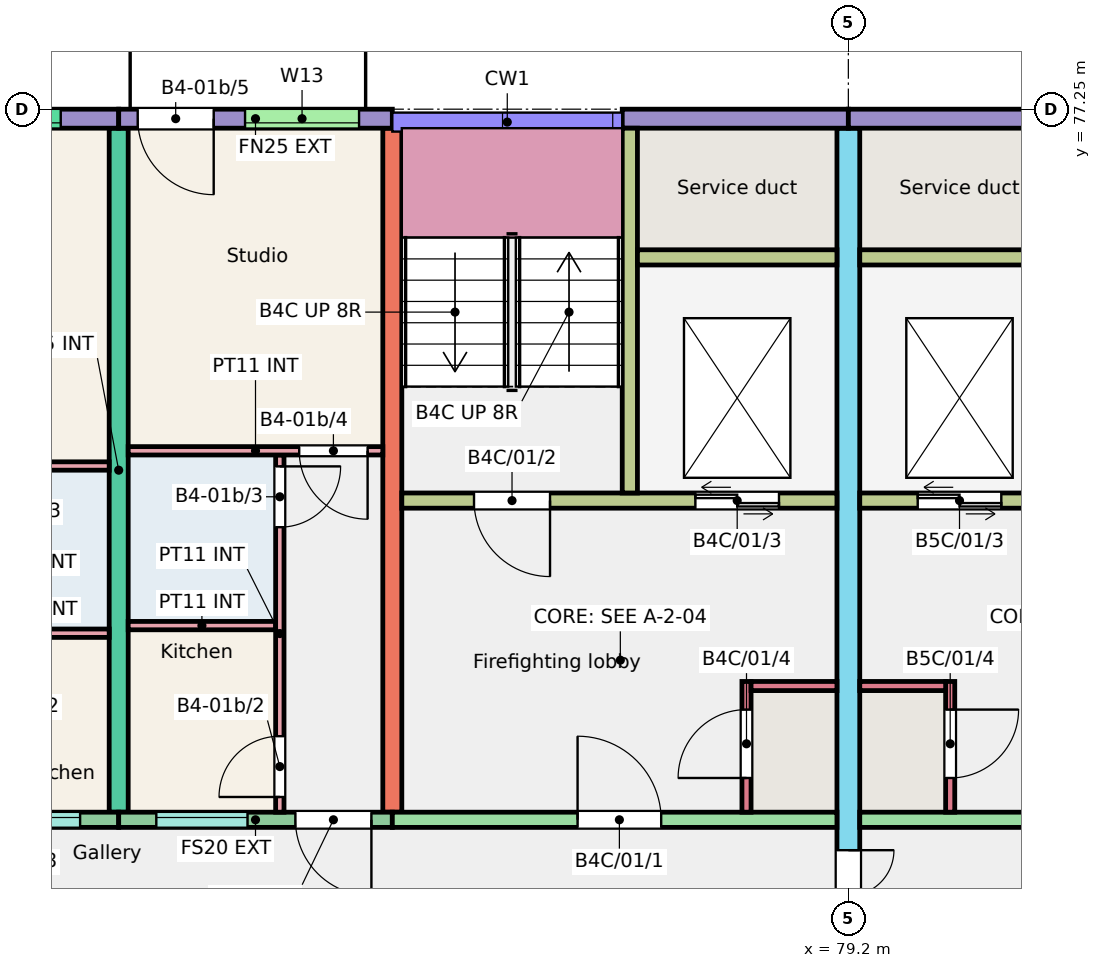
"""IFC4 building model, lengths in metres.
Left out: names, types, materials, properties, quantities, classifications, styles, units other than length and angle.
Written with IfcOpenShell. Run it as: python <this file> out.ifc"""

import sys

from ifc_helpers import new_model, si_unit, direction, frame, frame_2d, origin, place, context, subcontext, project, spatial, rectangle, extrude, element, fill, save


model = new_model("IFC4")
c1 = context("Model", 3, precision=1e-05, world=origin(), true_north=direction((0.0, 1.0)))
c2 = subcontext(c1, "Body", "Model", "MODEL_VIEW")
j1 = project(units=[si_unit("LENGTHUNIT", "METRE"), si_unit("PLANEANGLEUNIT", "RADIAN")], contexts=[c1])
p1 = place(None, origin())
s1 = spatial("IfcSite", under=j1, at=p1, CompositionType="ELEMENT")
p2 = place(p1, origin())
s2 = spatial("IfcBuilding", under=s1, at=p2, CompositionType="ELEMENT")
p3 = place(p2, frame((0.0, 0.0, 3.0)))
s3 = spatial("IfcBuildingStorey", under=s2, at=p3, CompositionType="ELEMENT", Elevation=3.0)
for number, where, z_axis, x_axis in (
    (1, (69.6, 68.0, 0.0), (0.0, 0.0, 1.0), (0.0, 1.0, 0.0)),
    (2, (73.2, 68.0, 0.0), (0.0, 0.0, 1.0), (0.0, 1.0, 0.0)),
):
    element("IfcWall", number, at=place(p3, frame(where, z_axis=z_axis, x_axis=x_axis)), inside=s3, PredefinedType="SHEAR", context=c2, shape_type="SweptSolid", body=[
        extrude(rectangle(XDim=9.0, YDim=0.25, at=frame_2d((4.5, 0.0))), origin(), (0.0, 0.0, 1.0), 3.0),
    ])
p4 = place(p3, frame((79.2, 66.0, 0.0), z_axis=(0.0, 0.0, 1.0), x_axis=(0.0, 1.0, 0.0)))
e3 = element("IfcWall", 3, at=p4, inside=s3, PredefinedType="SHEAR", context=c2, shape_type="SweptSolid", body=[
    extrude(rectangle(XDim=11.0, YDim=0.3, at=frame_2d((5.5, 0.0))), origin(), (0.0, 0.0, 1.0), 3.0),
])
p5 = place(p4, frame((0.3, 0.0, 0.0)))
e4 = element("IfcOpeningElement", 4, at=p5, cuts=e3, PredefinedType="OPENING", context=c2, shape_type="SweptSolid", body=[
    extrude(rectangle(XDim=1.2, YDim=2.1, at=frame_2d((0.6, 1.05))), frame((0.0, 0.16, 0.0), z_axis=(0.0, -1.0, 0.0), x_axis=(1.0, 0.0, 0.0)), (0.0, 0.0, 1.0), 0.32),
])
p6 = place(p3, frame((66.0, 77.125, 0.0), z_axis=(0.0, 0.0, 1.0), x_axis=(1.0, 0.0, 0.0)))
e5 = element("IfcWall", 5, at=p6, inside=s3, PredefinedType="SOLIDWALL", context=c2, shape_type="SweptSolid", body=[
    extrude(rectangle(XDim=3.6, YDim=0.25, at=frame_2d((1.8, 0.0))), origin(), (0.0, 0.0, 1.0), 3.0),
])
p7 = place(p6, frame((0.738, 0.0, 1.2)))
e6 = element("IfcOpeningElement", 6, at=p7, cuts=e5, PredefinedType="OPENING", context=c2, shape_type="SweptSolid", body=[
    extrude(rectangle(XDim=2.1, YDim=1.2, at=frame_2d((1.05, 0.6))), frame((0.0, 0.135, 0.0), z_axis=(0.0, -1.0, 0.0), x_axis=(1.0, 0.0, 0.0)), (0.0, 0.0, 1.0), 0.27),
])
p8 = place(p3, frame((66.0, 67.9, 0.0), z_axis=(0.0, 0.0, 1.0), x_axis=(1.0, 0.0, 0.0)))
e7 = element("IfcWall", 7, at=p8, inside=s3, PredefinedType="SOLIDWALL", context=c2, shape_type="SweptSolid", body=[
    extrude(rectangle(XDim=3.6, YDim=0.2, at=frame_2d((1.8, 0.0))), origin(), (0.0, 0.0, 1.0), 3.0),
])
p9 = place(p8, frame((1.893, 0.0, 1.1)))
e8 = element("IfcOpeningElement", 8, at=p9, cuts=e7, PredefinedType="OPENING", context=c2, shape_type="SweptSolid", body=[
    extrude(rectangle(XDim=1.2, YDim=1.3, at=frame_2d((0.6, 0.65))), frame((0.0, 0.11, 0.0), z_axis=(0.0, -1.0, 0.0), x_axis=(1.0, 0.0, 0.0)), (0.0, 0.0, 1.0), 0.22),
])
p10 = place(p8, frame((0.25, 0.0, 0.0)))
e9 = element("IfcOpeningElement", 9, at=p10, cuts=e7, PredefinedType="OPENING", context=c2, shape_type="SweptSolid", body=[
    extrude(rectangle(XDim=1.0, YDim=2.1, at=frame_2d((0.5, 1.05))), frame((0.0, 0.11, 0.0), z_axis=(0.0, -1.0, 0.0), x_axis=(1.0, 0.0, 0.0)), (0.0, 0.0, 1.0), 0.22),
])
p11 = place(p3, frame((69.6, 77.125, 0.0), z_axis=(0.0, 0.0, 1.0), x_axis=(1.0, 0.0, 0.0)))
e10 = element("IfcWall", 10, at=p11, inside=s3, PredefinedType="SOLIDWALL", context=c2, shape_type="SweptSolid", body=[
    extrude(rectangle(XDim=3.6, YDim=0.25, at=frame_2d((1.8, 0.0))), origin(), (0.0, 0.0, 1.0), 3.0),
])
p12 = place(p11, frame((1.663, 0.0, 1.2)))
e11 = element("IfcOpeningElement", 11, at=p12, cuts=e10, PredefinedType="OPENING", context=c2, shape_type="SweptSolid", body=[
    extrude(rectangle(XDim=1.5, YDim=1.2, at=frame_2d((0.75, 0.6))), frame((0.0, 0.135, 0.0), z_axis=(0.0, -1.0, 0.0), x_axis=(1.0, 0.0, 0.0)), (0.0, 0.0, 1.0), 0.27),
])
p13 = place(p11, frame((0.25, 0.0, 0.0)))
e12 = element("IfcOpeningElement", 12, at=p13, cuts=e10, PredefinedType="OPENING", context=c2, shape_type="SweptSolid", body=[
    extrude(rectangle(XDim=1.0, YDim=2.1, at=frame_2d((0.5, 1.05))), frame((0.0, 0.135, 0.0), z_axis=(0.0, -1.0, 0.0), x_axis=(1.0, 0.0, 0.0)), (0.0, 0.0, 1.0), 0.27),
])
p14 = place(p3, frame((69.6, 67.9, 0.0), z_axis=(0.0, 0.0, 1.0), x_axis=(1.0, 0.0, 0.0)))
e13 = element("IfcWall", 13, at=p14, inside=s3, PredefinedType="SOLIDWALL", context=c2, shape_type="SweptSolid", body=[
    extrude(rectangle(XDim=3.6, YDim=0.2, at=frame_2d((1.8, 0.0))), origin(), (0.0, 0.0, 1.0), 3.0),
])
p15 = place(p14, frame((0.495, 0.0, 1.1)))
e14 = element("IfcOpeningElement", 14, at=p15, cuts=e13, PredefinedType="OPENING", context=c2, shape_type="SweptSolid", body=[
    extrude(rectangle(XDim=1.2, YDim=1.3, at=frame_2d((0.6, 0.65))), frame((0.0, 0.11, 0.0), z_axis=(0.0, -1.0, 0.0), x_axis=(1.0, 0.0, 0.0)), (0.0, 0.0, 1.0), 0.22),
])
p16 = place(p14, frame((2.325, 0.0, 0.0)))
e15 = element("IfcOpeningElement", 15, at=p16, cuts=e13, PredefinedType="OPENING", context=c2, shape_type="SweptSolid", body=[
    extrude(rectangle(XDim=1.0, YDim=2.1, at=frame_2d((0.5, 1.05))), frame((0.0, 0.11, 0.0), z_axis=(0.0, -1.0, 0.0), x_axis=(1.0, 0.0, 0.0)), (0.0, 0.0, 1.0), 0.22),
])
p17 = place(p3, frame((76.225, 77.125, 0.0), z_axis=(0.0, 0.0, 1.0), x_axis=(1.0, 0.0, 0.0)))
e16 = element("IfcWall", 16, at=p17, inside=s3, PredefinedType="SOLIDWALL", context=c2, shape_type="SweptSolid", body=[
    extrude(rectangle(XDim=2.975, YDim=0.25, at=frame_2d((1.487, 0.0))), origin(), (0.0, 0.0, 1.0), 3.0),
])
p18 = place(p3, frame((73.2, 67.9, 0.0), z_axis=(0.0, 0.0, 1.0), x_axis=(1.0, 0.0, 0.0)))
e17 = element("IfcWall", 17, at=p18, inside=s3, PredefinedType="SHEAR", context=c2, shape_type="SweptSolid", body=[
    extrude(rectangle(XDim=5.85, YDim=0.2, at=frame_2d((2.925, 0.0))), origin(), (0.0, 0.0, 1.0), 3.0),
])
p19 = place(p18, frame((2.438, 0.0, 0.0)))
e18 = element("IfcOpeningElement", 18, at=p19, cuts=e17, PredefinedType="OPENING", context=c2, shape_type="SweptSolid", body=[
    extrude(rectangle(XDim=1.1, YDim=2.1, at=frame_2d((0.55, 1.05))), frame((0.0, 0.11, 0.0), z_axis=(0.0, -1.0, 0.0), x_axis=(1.0, 0.0, 0.0)), (0.0, 0.0, 1.0), 0.22),
])
p20 = place(p3, frame((73.325, 72.1, 0.0), z_axis=(0.0, 0.0, 1.0), x_axis=(1.0, 0.0, 0.0)))
e19 = element("IfcWall", 19, at=p20, inside=s3, PredefinedType="SHEAR", context=c2, shape_type="SweptSolid", body=[
    extrude(rectangle(XDim=5.725, YDim=0.2, at=frame_2d((2.863, 0.0))), origin(), (0.0, 0.0, 1.0), 3.0),
])
p21 = place(p20, frame((0.95, 0.0, 0.0)))
e20 = element("IfcOpeningElement", 20, at=p21, cuts=e19, PredefinedType="OPENING", context=c2, shape_type="SweptSolid", body=[
    extrude(rectangle(XDim=1.0, YDim=2.1, at=frame_2d((0.5, 1.05))), frame((0.0, 0.11, 0.0), z_axis=(0.0, -1.0, 0.0), x_axis=(1.0, 0.0, 0.0)), (0.0, 0.0, 1.0), 0.22),
])
p22 = place(p20, frame((3.863, 0.0, 0.0)))
e21 = element("IfcOpeningElement", 21, at=p22, cuts=e19, PredefinedType="OPENING", context=c2, shape_type="SweptSolid", body=[
    extrude(rectangle(XDim=1.1, YDim=2.1, at=frame_2d((0.55, 1.05))), frame((0.0, 0.11, 0.0), z_axis=(0.0, -1.0, 0.0), x_axis=(1.0, 0.0, 0.0)), (0.0, 0.0, 1.0), 0.22),
])
p23 = place(p3, frame((76.325, 72.2, 0.0), z_axis=(0.0, 0.0, 1.0), x_axis=(0.0, 1.0, 0.0)))
e22 = element("IfcWall", 22, at=p23, inside=s3, PredefinedType="SHEAR", context=c2, shape_type="SweptSolid", body=[
    extrude(rectangle(XDim=4.8, YDim=0.2, at=frame_2d((2.4, 0.0))), origin(), (0.0, 0.0, 1.0), 3.0),
])
p24 = place(p3, frame((76.425, 75.3, 0.0), z_axis=(0.0, 0.0, 1.0), x_axis=(1.0, 0.0, 0.0)))
e23 = element("IfcWall", 23, at=p24, inside=s3, PredefinedType="SHEAR", context=c2, shape_type="SweptSolid", body=[
    extrude(rectangle(XDim=2.625, YDim=0.2, at=frame_2d((1.312, 0.0))), origin(), (0.0, 0.0, 1.0), 3.0),
])
p25 = place(p3, frame((77.86, 68.0, 0.0), z_axis=(0.0, 0.0, 1.0), x_axis=(0.0, 1.0, 0.0)))
e24 = element("IfcWall", 24, at=p25, inside=s3, PredefinedType="SHEAR", context=c2, shape_type="SweptSolid", body=[
    extrude(rectangle(XDim=1.72, YDim=0.12, at=frame_2d((0.86, 0.0))), origin(), (0.0, 0.0, 1.0), 3.0),
])
p26 = place(p25, frame((0.45, 0.0, 0.0)))
e25 = element("IfcOpeningElement", 25, at=p26, cuts=e24, PredefinedType="OPENING", context=c2, shape_type="SweptSolid", body=[
    extrude(rectangle(XDim=0.9, YDim=2.1, at=frame_2d((0.45, 1.05))), frame((0.0, 0.07, 0.0), z_axis=(0.0, -1.0, 0.0), x_axis=(1.0, 0.0, 0.0)), (0.0, 0.0, 1.0), 0.14),
])
p27 = place(p3, frame((77.92, 69.66, 0.0), z_axis=(0.0, 0.0, 1.0), x_axis=(1.0, 0.0, 0.0)))
e26 = element("IfcWall", 26, at=p27, inside=s3, PredefinedType="SHEAR", context=c2, shape_type="SweptSolid", body=[
    extrude(rectangle(XDim=1.13, YDim=0.12, at=frame_2d((0.565, 0.0))), origin(), (0.0, 0.0, 1.0), 3.0),
])
p28 = place(p3, frame((79.2, 77.125, 0.0), z_axis=(0.0, 0.0, 1.0), x_axis=(1.0, 0.0, 0.0)))
e27 = element("IfcWall", 27, at=p28, inside=s3, PredefinedType="SOLIDWALL", context=c2, shape_type="SweptSolid", body=[
    extrude(rectangle(XDim=2.975, YDim=0.25, at=frame_2d((1.488, 0.0))), origin(), (0.0, 0.0, 1.0), 3.0),
])
p29 = place(p3, frame((79.35, 67.9, 0.0), z_axis=(0.0, 0.0, 1.0), x_axis=(1.0, 0.0, 0.0)))
e28 = element("IfcWall", 28, at=p29, inside=s3, PredefinedType="SHEAR", context=c2, shape_type="SweptSolid", body=[
    extrude(rectangle(XDim=5.85, YDim=0.2, at=frame_2d((2.925, 0.0))), origin(), (0.0, 0.0, 1.0), 3.0),
])
p30 = place(p29, frame((2.312, 0.0, 0.0)))
e29 = element("IfcOpeningElement", 29, at=p30, cuts=e28, PredefinedType="OPENING", context=c2, shape_type="SweptSolid", body=[
    extrude(rectangle(XDim=1.1, YDim=2.1, at=frame_2d((0.55, 1.05))), frame((0.0, 0.11, 0.0), z_axis=(0.0, -1.0, 0.0), x_axis=(1.0, 0.0, 0.0)), (0.0, 0.0, 1.0), 0.22),
])
p31 = place(p3, frame((79.35, 72.1, 0.0), z_axis=(0.0, 0.0, 1.0), x_axis=(1.0, 0.0, 0.0)))
e30 = element("IfcWall", 30, at=p31, inside=s3, PredefinedType="SHEAR", context=c2, shape_type="SweptSolid", body=[
    extrude(rectangle(XDim=5.725, YDim=0.2, at=frame_2d((2.862, 0.0))), origin(), (0.0, 0.0, 1.0), 3.0),
])
p32 = place(p31, frame((3.775, 0.0, 0.0)))
e31 = element("IfcOpeningElement", 31, at=p32, cuts=e30, PredefinedType="OPENING", context=c2, shape_type="SweptSolid", body=[
    extrude(rectangle(XDim=1.0, YDim=2.1, at=frame_2d((0.5, 1.05))), frame((0.0, 0.11, 0.0), z_axis=(0.0, -1.0, 0.0), x_axis=(1.0, 0.0, 0.0)), (0.0, 0.0, 1.0), 0.22),
])
p33 = place(p31, frame((0.762, 0.0, 0.0)))
e32 = element("IfcOpeningElement", 32, at=p33, cuts=e30, PredefinedType="OPENING", context=c2, shape_type="SweptSolid", body=[
    extrude(rectangle(XDim=1.1, YDim=2.1, at=frame_2d((0.55, 1.05))), frame((0.0, 0.11, 0.0), z_axis=(0.0, -1.0, 0.0), x_axis=(1.0, 0.0, 0.0)), (0.0, 0.0, 1.0), 0.22),
])
p34 = place(p3, frame((79.35, 75.3, 0.0), z_axis=(0.0, 0.0, 1.0), x_axis=(1.0, 0.0, 0.0)))
e33 = element("IfcWall", 33, at=p34, inside=s3, PredefinedType="SHEAR", context=c2, shape_type="SweptSolid", body=[
    extrude(rectangle(XDim=2.625, YDim=0.2, at=frame_2d((1.312, 0.0))), origin(), (0.0, 0.0, 1.0), 3.0),
])
p35 = place(p3, frame((80.54, 68.0, 0.0), z_axis=(0.0, 0.0, 1.0), x_axis=(0.0, 1.0, 0.0)))
e34 = element("IfcWall", 34, at=p35, inside=s3, PredefinedType="SHEAR", context=c2, shape_type="SweptSolid", body=[
    extrude(rectangle(XDim=1.72, YDim=0.12, at=frame_2d((0.86, 0.0))), origin(), (0.0, 0.0, 1.0), 3.0),
])
p36 = place(p35, frame((0.45, 0.0, 0.0)))
e35 = element("IfcOpeningElement", 35, at=p36, cuts=e34, PredefinedType="OPENING", context=c2, shape_type="SweptSolid", body=[
    extrude(rectangle(XDim=0.9, YDim=2.1, at=frame_2d((0.45, 1.05))), frame((0.0, 0.07, 0.0), z_axis=(0.0, -1.0, 0.0), x_axis=(1.0, 0.0, 0.0)), (0.0, 0.0, 1.0), 0.14),
])
p37 = place(p3, frame((79.35, 69.66, 0.0), z_axis=(0.0, 0.0, 1.0), x_axis=(1.0, 0.0, 0.0)))
e36 = element("IfcWall", 36, at=p37, inside=s3, PredefinedType="SHEAR", context=c2, shape_type="SweptSolid", body=[
    extrude(rectangle(XDim=1.13, YDim=0.12, at=frame_2d((0.565, 0.0))), origin(), (0.0, 0.0, 1.0), 3.0),
])
p38 = place(p3, frame((67.51, 70.355, 0.0), z_axis=(0.0, 0.0, 1.0), x_axis=(1.0, 0.0, 0.0)))
e37 = element("IfcWall", 37, at=p38, inside=s3, PredefinedType="PARTITIONING", context=c2, shape_type="SweptSolid", body=[
    extrude(rectangle(XDim=1.965, YDim=0.11, at=frame_2d((0.982, 0.0))), origin(), (0.0, 0.0, 1.0), 2.8),
])
p39 = place(p3, frame((66.1, 72.555, 0.0), z_axis=(0.0, 0.0, 1.0), x_axis=(1.0, 0.0, 0.0)))
e38 = element("IfcWall", 38, at=p39, inside=s3, PredefinedType="PARTITIONING", context=c2, shape_type="SweptSolid", body=[
    extrude(rectangle(XDim=3.375, YDim=0.11, at=frame_2d((1.688, 0.0))), origin(), (0.0, 0.0, 1.0), 2.8),
])
p40 = place(p39, frame((0.2, 0.0, 0.0)))
e39 = element("IfcOpeningElement", 39, at=p40, cuts=e38, PredefinedType="OPENING", context=c2, shape_type="SweptSolid", body=[
    extrude(rectangle(XDim=0.9, YDim=2.1, at=frame_2d((0.45, 1.05))), frame((0.0, 0.065, 0.0), z_axis=(0.0, -1.0, 0.0), x_axis=(1.0, 0.0, 0.0)), (0.0, 0.0, 1.0), 0.13),
])
p41 = place(p3, frame((69.725, 70.455, 0.0), z_axis=(0.0, 0.0, 1.0), x_axis=(1.0, 0.0, 0.0)))
e40 = element("IfcWall", 40, at=p41, inside=s3, PredefinedType="PARTITIONING", context=c2, shape_type="SweptSolid", body=[
    extrude(rectangle(XDim=1.94, YDim=0.11, at=frame_2d((0.97, 0.0))), origin(), (0.0, 0.0, 1.0), 2.8),
])
p42 = place(p3, frame((71.72, 68.0, 0.0), z_axis=(0.0, 0.0, 1.0), x_axis=(0.0, 1.0, 0.0)))
e41 = element("IfcWall", 41, at=p42, inside=s3, PredefinedType="PARTITIONING", context=c2, shape_type="SweptSolid", body=[
    extrude(rectangle(XDim=4.7, YDim=0.11, at=frame_2d((2.35, 0.0))), origin(), (0.0, 0.0, 1.0), 2.8),
])
p43 = place(p42, frame((0.2, 0.0, 0.0)))
e42 = element("IfcOpeningElement", 42, at=p43, cuts=e41, PredefinedType="OPENING", context=c2, shape_type="SweptSolid", body=[
    extrude(rectangle(XDim=0.8, YDim=2.1, at=frame_2d((0.4, 1.05))), frame((0.0, 0.065, 0.0), z_axis=(0.0, -1.0, 0.0), x_axis=(1.0, 0.0, 0.0)), (0.0, 0.0, 1.0), 0.13),
])
p44 = place(p42, frame((3.75, 0.0, 0.0)))
e43 = element("IfcOpeningElement", 43, at=p44, cuts=e41, PredefinedType="OPENING", context=c2, shape_type="SweptSolid", body=[
    extrude(rectangle(XDim=0.8, YDim=2.1, at=frame_2d((0.4, 1.05))), frame((0.0, 0.065, 0.0), z_axis=(0.0, -1.0, 0.0), x_axis=(1.0, 0.0, 0.0)), (0.0, 0.0, 1.0), 0.13),
])
p45 = place(p3, frame((69.725, 72.755, 0.0), z_axis=(0.0, 0.0, 1.0), x_axis=(1.0, 0.0, 0.0)))
e44 = element("IfcWall", 44, at=p45, inside=s3, PredefinedType="PARTITIONING", context=c2, shape_type="SweptSolid", body=[
    extrude(rectangle(XDim=3.35, YDim=0.11, at=frame_2d((1.675, 0.0))), origin(), (0.0, 0.0, 1.0), 2.8),
])
p46 = place(p45, frame((2.25, 0.0, 0.0)))
e45 = element("IfcOpeningElement", 45, at=p46, cuts=e44, PredefinedType="OPENING", context=c2, shape_type="SweptSolid", body=[
    extrude(rectangle(XDim=0.9, YDim=2.1, at=frame_2d((0.45, 1.05))), frame((0.0, 0.065, 0.0), z_axis=(0.0, -1.0, 0.0), x_axis=(1.0, 0.0, 0.0)), (0.0, 0.0, 1.0), 0.13),
])
p47 = place(p9, origin())
e46 = element("IfcWindow", 46, at=p47, inside=s3, PartitioningType="SINGLE_PANEL", PredefinedType="WINDOW", context=c2, shape_type="SweptSolid", body=[
    extrude(rectangle(XDim=1.2, YDim=1.3, at=frame_2d((0.6, 0.65))), frame((0.0, 0.06, 0.0), z_axis=(0.0, -1.0, 0.0), x_axis=(1.0, 0.0, 0.0)), (0.0, 0.0, 1.0), 0.06),
])
fill(e8, e46)
p48 = place(p7, origin())
e47 = element("IfcWindow", 47, at=p48, inside=s3, PartitioningType="SINGLE_PANEL", PredefinedType="WINDOW", context=c2, shape_type="SweptSolid", body=[
    extrude(rectangle(XDim=2.1, YDim=1.2, at=frame_2d((1.05, 0.6))), frame((0.0, -0.025, 0.0), z_axis=(0.0, -1.0, 0.0), x_axis=(1.0, 0.0, 0.0)), (0.0, 0.0, 1.0), 0.06),
])
fill(e6, e47)
p49 = place(p15, origin())
e48 = element("IfcWindow", 48, at=p49, inside=s3, PartitioningType="SINGLE_PANEL", PredefinedType="WINDOW", context=c2, shape_type="SweptSolid", body=[
    extrude(rectangle(XDim=1.2, YDim=1.3, at=frame_2d((0.6, 0.65))), frame((0.0, 0.06, 0.0), z_axis=(0.0, -1.0, 0.0), x_axis=(1.0, 0.0, 0.0)), (0.0, 0.0, 1.0), 0.06),
])
fill(e14, e48)
p50 = place(p12, origin())
e49 = element("IfcWindow", 49, at=p50, inside=s3, PartitioningType="SINGLE_PANEL", PredefinedType="WINDOW", context=c2, shape_type="SweptSolid", body=[
    extrude(rectangle(XDim=1.5, YDim=1.2, at=frame_2d((0.75, 0.6))), frame((0.0, -0.025, 0.0), z_axis=(0.0, -1.0, 0.0), x_axis=(1.0, 0.0, 0.0)), (0.0, 0.0, 1.0), 0.06),
])
fill(e11, e49)
p51 = place(p16, origin())
e50 = element("IfcDoor", 50, at=p51, inside=s3, OperationType="SINGLE_SWING_RIGHT", PredefinedType="DOOR", context=c2, shape_type="SweptSolid", body=[
    extrude(rectangle(XDim=1.0, YDim=2.1, at=frame_2d((0.5, 1.05))), frame((0.0, 0.025, 0.0), z_axis=(0.0, -1.0, 0.0), x_axis=(1.0, 0.0, 0.0)), (0.0, 0.0, 1.0), 0.05),
])
fill(e15, e50)
p52 = place(p43, origin())
e51 = element("IfcDoor", 51, at=p52, inside=s3, OperationType="SINGLE_SWING_LEFT", PredefinedType="DOOR", context=c2, shape_type="SweptSolid", body=[
    extrude(rectangle(XDim=0.8, YDim=2.1, at=frame_2d((0.4, 1.05))), frame((0.0, 0.025, 0.0), z_axis=(0.0, -1.0, 0.0), x_axis=(1.0, 0.0, 0.0)), (0.0, 0.0, 1.0), 0.05),
])
fill(e42, e51)
p53 = place(p44, origin())
e52 = element("IfcDoor", 52, at=p53, inside=s3, OperationType="SINGLE_SWING_RIGHT", PredefinedType="DOOR", context=c2, shape_type="SweptSolid", body=[
    extrude(rectangle(XDim=0.8, YDim=2.1, at=frame_2d((0.4, 1.05))), frame((0.0, 0.025, 0.0), z_axis=(0.0, -1.0, 0.0), x_axis=(1.0, 0.0, 0.0)), (0.0, 0.0, 1.0), 0.05),
])
fill(e43, e52)
p54 = place(p46, origin())
e53 = element("IfcDoor", 53, at=p54, inside=s3, OperationType="SINGLE_SWING_RIGHT", PredefinedType="DOOR", context=c2, shape_type="SweptSolid", body=[
    extrude(rectangle(XDim=0.9, YDim=2.1, at=frame_2d((0.45, 1.05))), frame((0.0, 0.025, 0.0), z_axis=(0.0, -1.0, 0.0), x_axis=(1.0, 0.0, 0.0)), (0.0, 0.0, 1.0), 0.05),
])
fill(e45, e53)
p55 = place(p13, origin())
e54 = element("IfcDoor", 54, at=p55, inside=s3, OperationType="SINGLE_SWING_RIGHT", PredefinedType="DOOR", context=c2, shape_type="SweptSolid", body=[
    extrude(rectangle(XDim=1.0, YDim=2.1, at=frame_2d((0.5, 1.05))), frame((0.0, 0.025, 0.0), z_axis=(0.0, -1.0, 0.0), x_axis=(1.0, 0.0, 0.0)), (0.0, 0.0, 1.0), 0.05),
])
fill(e12, e54)
p56 = place(p19, origin())
e55 = element("IfcDoor", 55, at=p56, inside=s3, OperationType="SINGLE_SWING_LEFT", PredefinedType="DOOR", context=c2, shape_type="SweptSolid", body=[
    extrude(rectangle(XDim=1.1, YDim=2.1, at=frame_2d((0.55, 1.05))), frame((0.0, 0.025, 0.0), z_axis=(0.0, -1.0, 0.0), x_axis=(1.0, 0.0, 0.0)), (0.0, 0.0, 1.0), 0.05),
])
fill(e18, e55)
p57 = place(p21, origin())
e56 = element("IfcDoor", 56, at=p57, inside=s3, OperationType="SINGLE_SWING_RIGHT", PredefinedType="DOOR", context=c2, shape_type="SweptSolid", body=[
    extrude(rectangle(XDim=1.0, YDim=2.1, at=frame_2d((0.5, 1.05))), frame((0.0, 0.025, 0.0), z_axis=(0.0, -1.0, 0.0), x_axis=(1.0, 0.0, 0.0)), (0.0, 0.0, 1.0), 0.05),
])
fill(e20, e56)
p58 = place(p22, origin())
e57 = element("IfcDoor", 57, at=p58, inside=s3, OperationType="DOUBLE_DOOR_SLIDING", PredefinedType="DOOR", context=c2, shape_type="SweptSolid", body=[
    extrude(rectangle(XDim=1.1, YDim=2.1, at=frame_2d((0.55, 1.05))), frame((0.0, 0.025, 0.0), z_axis=(0.0, -1.0, 0.0), x_axis=(1.0, 0.0, 0.0)), (0.0, 0.0, 1.0), 0.05),
])
fill(e21, e57)
p59 = place(p26, origin())
e58 = element("IfcDoor", 58, at=p59, inside=s3, OperationType="SINGLE_SWING_LEFT", PredefinedType="DOOR", context=c2, shape_type="SweptSolid", body=[
    extrude(rectangle(XDim=0.9, YDim=2.1, at=frame_2d((0.45, 1.05))), frame((0.0, 0.025, 0.0), z_axis=(0.0, -1.0, 0.0), x_axis=(1.0, 0.0, 0.0)), (0.0, 0.0, 1.0), 0.05),
])
fill(e25, e58)
p60 = place(p33, origin())
e59 = element("IfcDoor", 59, at=p60, inside=s3, OperationType="DOUBLE_DOOR_SLIDING", PredefinedType="DOOR", context=c2, shape_type="SweptSolid", body=[
    extrude(rectangle(XDim=1.1, YDim=2.1, at=frame_2d((0.55, 1.05))), frame((0.0, 0.025, 0.0), z_axis=(0.0, -1.0, 0.0), x_axis=(1.0, 0.0, 0.0)), (0.0, 0.0, 1.0), 0.05),
])
fill(e32, e59)
p61 = place(p36, origin())
e60 = element("IfcDoor", 60, at=p61, inside=s3, OperationType="SINGLE_SWING_RIGHT", PredefinedType="DOOR", context=c2, shape_type="SweptSolid", body=[
    extrude(rectangle(XDim=0.9, YDim=2.1, at=frame_2d((0.45, 1.05))), frame((0.0, 0.025, 0.0), z_axis=(0.0, -1.0, 0.0), x_axis=(1.0, 0.0, 0.0)), (0.0, 0.0, 1.0), 0.05),
])
fill(e35, e60)
p62 = place(p5, origin())
e61 = element("IfcDoor", 61, at=p62, inside=s3, OperationType="DOUBLE_DOOR_SINGLE_SWING", PredefinedType="DOOR", context=c2, shape_type="SweptSolid", body=[
    extrude(rectangle(XDim=1.2, YDim=2.1, at=frame_2d((0.6, 1.05))), frame((0.0, 0.025, 0.0), z_axis=(0.0, -1.0, 0.0), x_axis=(1.0, 0.0, 0.0)), (0.0, 0.0, 1.0), 0.05),
])
fill(e4, e61)
save(model, sys.argv[1])
